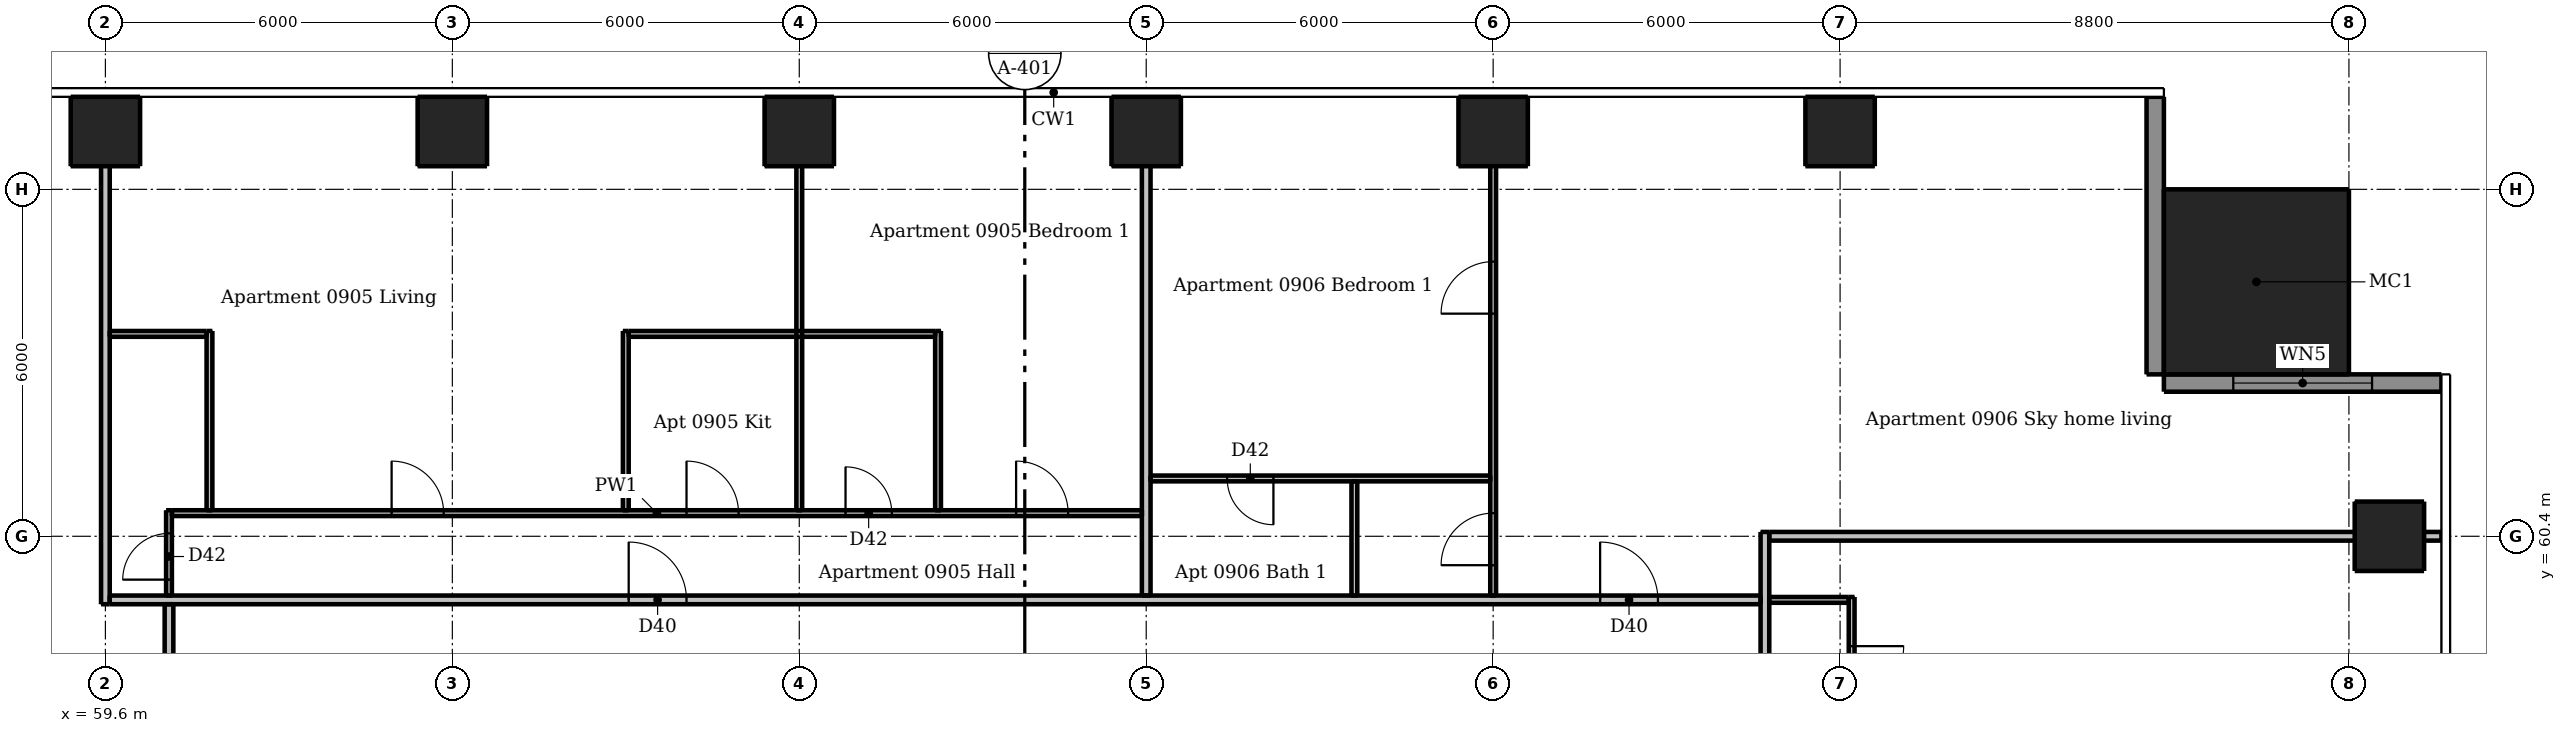
"""IFC4 building model, lengths in metres.
Left out: names, types, materials, properties, quantities, classifications, styles, units other than length and angle.
Written with IfcOpenShell. Run it as: python <this file> out.ifc"""

import sys

from ifc_helpers import new_model, si_unit, direction, frame, frame_2d, origin, origin_2d, place, context, subcontext, project, spatial, rectangle, extrude, element, fill, save


model = new_model("IFC4")
c1 = context("Model", 3, precision=1e-05, world=origin(), true_north=direction((0.0, 1.0)))
c2 = subcontext(c1, "Body", "Model", "MODEL_VIEW")
j1 = project(units=[si_unit("LENGTHUNIT", "METRE"), si_unit("PLANEANGLEUNIT", "RADIAN")], contexts=[c1])
p1 = place(None, origin())
s1 = spatial("IfcSite", under=j1, at=p1, CompositionType="ELEMENT")
p2 = place(p1, origin())
s2 = spatial("IfcBuilding", under=s1, at=p2, CompositionType="ELEMENT")
p3 = place(p2, frame((0.0, 0.0, 36.7)))
s3 = spatial("IfcBuildingStorey", under=s2, at=p3, CompositionType="ELEMENT", Elevation=36.7)
for number, where, z_axis, x_axis in (
    (1, (99.1, 60.4, 0.0), (0.0, 0.0, 1.0), (1.0, 0.0, 0.0)),
    (2, (59.6, 67.4, 0.0), (0.0, 0.0, 1.0), (1.0, 0.0, 0.0)),
    (3, (65.6, 67.4, 0.0), (0.0, 0.0, 1.0), (1.0, 0.0, 0.0)),
    (4, (71.6, 67.4, 0.0), (0.0, 0.0, 1.0), (1.0, 0.0, 0.0)),
    (5, (77.6, 67.4, 0.0), (0.0, 0.0, 1.0), (1.0, 0.0, 0.0)),
    (6, (83.6, 67.4, 0.0), (0.0, 0.0, 1.0), (1.0, 0.0, 0.0)),
    (7, (89.6, 67.4, 0.0), (0.0, 0.0, 1.0), (1.0, 0.0, 0.0)),
):
    element("IfcColumn", number, at=place(p3, frame(where, z_axis=z_axis, x_axis=x_axis)), inside=s3, PredefinedType="COLUMN", context=c2, shape_type="SweptSolid", body=[
        extrude(rectangle(XDim=1.2, YDim=1.2, at=origin_2d()), origin(), (0.0, 0.0, 1.0), 3.05),
    ])
p4 = place(p3, frame((96.8, 64.8, 0.0), z_axis=(0.0, 0.0, 1.0), x_axis=(1.0, 0.0, 0.0)))
e8 = element("IfcColumn", 8, at=p4, inside=s3, PredefinedType="COLUMN", context=c2, shape_type="SweptSolid", body=[
    extrude(rectangle(XDim=3.2, YDim=3.2, at=origin_2d()), origin(), (0.0, 0.0, 1.0), 3.3),
])
p5 = place(p3, frame((100.0, 63.05, 0.0), z_axis=(0.0, 0.0, 1.0), x_axis=(-1.0, 0.0, 0.0)))
e9 = element("IfcWall", 9, at=p5, inside=s3, PredefinedType="SOLIDWALL", context=c2, shape_type="SweptSolid", body=[
    extrude(rectangle(XDim=4.8, YDim=0.3, at=frame_2d((2.4, 0.0))), origin(), (0.0, 0.0, 1.0), 3.05),
])
p6 = place(p5, frame((1.2, 0.0, 0.15)))
e10 = element("IfcOpeningElement", 10, at=p6, cuts=e9, PredefinedType="OPENING", context=c2, shape_type="SweptSolid", body=[
    extrude(rectangle(XDim=2.4, YDim=2.1, at=frame_2d((1.2, 1.05))), frame((0.0, 0.16, 0.0), z_axis=(0.0, -1.0, 0.0), x_axis=(1.0, 0.0, 0.0)), (0.0, 0.0, 1.0), 0.32),
])
p7 = place(p3, frame((95.05, 63.2, 0.0), z_axis=(0.0, 0.0, 1.0), x_axis=(0.0, 1.0, 0.0)))
e11 = element("IfcWall", 11, at=p7, inside=s3, PredefinedType="SOLIDWALL", context=c2, shape_type="SweptSolid", body=[
    extrude(rectangle(XDim=4.8, YDim=0.3, at=frame_2d((2.4, 0.0))), origin(), (0.0, 0.0, 1.0), 3.05),
])
p8 = place(p3, frame((60.7, 59.375, 0.0), z_axis=(0.0, 0.0, 1.0), x_axis=(0.0, 1.0, 0.0)))
e12 = element("IfcWall", 12, at=p8, inside=s3, PredefinedType="PARTITIONING", context=c2, shape_type="SweptSolid", body=[
    extrude(rectangle(XDim=1.475, YDim=0.1, at=frame_2d((0.738, 0.0))), origin(), (0.0, 0.0, 1.0), 3.05),
])
p9 = place(p8, frame((0.275, 0.0, 0.0)))
e13 = element("IfcOpeningElement", 13, at=p9, cuts=e12, PredefinedType="OPENING", context=c2, shape_type="SweptSolid", body=[
    extrude(rectangle(XDim=0.8, YDim=2.1, at=frame_2d((0.4, 1.05))), frame((0.0, 0.06, 0.0), z_axis=(0.0, -1.0, 0.0), x_axis=(1.0, 0.0, 0.0)), (0.0, 0.0, 1.0), 0.12),
])
for number, where, z_axis, x_axis in (
    (14, (61.4, 60.85, 0.0), (0.0, 0.0, 1.0), (0.0, 1.0, 0.0)),
    (15, (68.6, 60.85, 0.0), (0.0, 0.0, 1.0), (0.0, 1.0, 0.0)),
):
    element("IfcWall", number, at=place(p3, frame(where, z_axis=z_axis, x_axis=x_axis)), inside=s3, PredefinedType="PARTITIONING", context=c2, shape_type="SweptSolid", body=[
        extrude(rectangle(XDim=3.1, YDim=0.1, at=frame_2d((1.55, 0.0))), origin(), (0.0, 0.0, 1.0), 3.05),
    ])
p10 = place(p3, frame((71.6, 60.85, 0.0), z_axis=(0.0, 0.0, 1.0), x_axis=(0.0, 1.0, 0.0)))
e16 = element("IfcWall", 16, at=p10, inside=s3, PredefinedType="PARTITIONING", context=c2, shape_type="SweptSolid", body=[
    extrude(rectangle(XDim=7.15, YDim=0.1, at=frame_2d((3.575, 0.0))), origin(), (0.0, 0.0, 1.0), 2.516),
])
p11 = place(p3, frame((74.0, 60.85, 0.0), z_axis=(0.0, 0.0, 1.0), x_axis=(0.0, 1.0, 0.0)))
e17 = element("IfcWall", 17, at=p11, inside=s3, PredefinedType="PARTITIONING", context=c2, shape_type="SweptSolid", body=[
    extrude(rectangle(XDim=3.1, YDim=0.1, at=frame_2d((1.55, 0.0))), origin(), (0.0, 0.0, 1.0), 3.05),
])
p12 = place(p3, frame((81.2, 59.375, 0.0), z_axis=(0.0, 0.0, 1.0), x_axis=(0.0, 1.0, 0.0)))
e18 = element("IfcWall", 18, at=p12, inside=s3, PredefinedType="PARTITIONING", context=c2, shape_type="SweptSolid", body=[
    extrude(rectangle(XDim=1.975, YDim=0.1, at=frame_2d((0.988, 0.0))), origin(), (0.0, 0.0, 1.0), 3.05),
])
p13 = place(p3, frame((83.6, 59.375, 0.0), z_axis=(0.0, 0.0, 1.0), x_axis=(0.0, 1.0, 0.0)))
e19 = element("IfcWall", 19, at=p13, inside=s3, PredefinedType="PARTITIONING", context=c2, shape_type="SweptSolid", body=[
    extrude(rectangle(XDim=8.625, YDim=0.1, at=frame_2d((4.312, 0.0))), origin(), (0.0, 0.0, 1.0), 2.516),
])
p14 = place(p13, frame((0.525, 0.0, 0.0)))
e20 = element("IfcOpeningElement", 20, at=p14, cuts=e19, PredefinedType="OPENING", context=c2, shape_type="SweptSolid", body=[
    extrude(rectangle(XDim=0.9, YDim=2.1, at=frame_2d((0.45, 1.05))), frame((0.0, 0.06, 0.0), z_axis=(0.0, -1.0, 0.0), x_axis=(1.0, 0.0, 0.0)), (0.0, 0.0, 1.0), 0.12),
])
p15 = place(p13, frame((4.875, 0.0, 0.0)))
e21 = element("IfcOpeningElement", 21, at=p15, cuts=e19, PredefinedType="OPENING", context=c2, shape_type="SweptSolid", body=[
    extrude(rectangle(XDim=0.9, YDim=2.1, at=frame_2d((0.45, 1.05))), frame((0.0, 0.06, 0.0), z_axis=(0.0, -1.0, 0.0), x_axis=(1.0, 0.0, 0.0)), (0.0, 0.0, 1.0), 0.12),
])
p16 = place(p3, frame((89.8, 59.35, 0.0), z_axis=(0.0, 0.0, 1.0), x_axis=(0.0, -1.0, 0.0)))
e22 = element("IfcWall", 22, at=p16, inside=s3, PredefinedType="PARTITIONING", context=c2, shape_type="SweptSolid", body=[
    extrude(rectangle(XDim=19.875, YDim=0.1, at=frame_2d((9.938, 0.0))), origin(), (0.0, 0.0, 1.0), 3.05),
])
p17 = place(p16, frame((15.0, 0.0, 0.0)))
e23 = element("IfcOpeningElement", 23, at=p17, cuts=e22, PredefinedType="OPENING", context=c2, shape_type="SweptSolid", body=[
    extrude(rectangle(XDim=0.9, YDim=2.1, at=frame_2d((0.45, 1.05))), frame((0.0, 0.06, 0.0), z_axis=(0.0, -1.0, 0.0), x_axis=(1.0, 0.0, 0.0)), (0.0, 0.0, 1.0), 0.12),
])
p18 = place(p16, frame((9.0, 0.0, 0.0)))
e24 = element("IfcOpeningElement", 24, at=p18, cuts=e22, PredefinedType="OPENING", context=c2, shape_type="SweptSolid", body=[
    extrude(rectangle(XDim=0.9, YDim=2.1, at=frame_2d((0.45, 1.05))), frame((0.0, 0.06, 0.0), z_axis=(0.0, -1.0, 0.0), x_axis=(1.0, 0.0, 0.0)), (0.0, 0.0, 1.0), 0.12),
])
p19 = place(p16, frame((6.0, 0.0, 0.0)))
e25 = element("IfcOpeningElement", 25, at=p19, cuts=e22, PredefinedType="OPENING", context=c2, shape_type="SweptSolid", body=[
    extrude(rectangle(XDim=0.9, YDim=2.1, at=frame_2d((0.45, 1.05))), frame((0.0, 0.06, 0.0), z_axis=(0.0, -1.0, 0.0), x_axis=(1.0, 0.0, 0.0)), (0.0, 0.0, 1.0), 0.12),
])
p20 = place(p16, frame((0.85, 0.0, 0.0)))
e26 = element("IfcOpeningElement", 26, at=p20, cuts=e22, PredefinedType="OPENING", context=c2, shape_type="SweptSolid", body=[
    extrude(rectangle(XDim=0.9, YDim=2.1, at=frame_2d((0.45, 1.05))), frame((0.0, 0.06, 0.0), z_axis=(0.0, -1.0, 0.0), x_axis=(1.0, 0.0, 0.0)), (0.0, 0.0, 1.0), 0.12),
])
p21 = place(p16, frame((3.35, 0.0, 0.0)))
e27 = element("IfcOpeningElement", 27, at=p21, cuts=e22, PredefinedType="OPENING", context=c2, shape_type="SweptSolid", body=[
    extrude(rectangle(XDim=0.8, YDim=2.1, at=frame_2d((0.4, 1.05))), frame((0.0, 0.06, 0.0), z_axis=(0.0, -1.0, 0.0), x_axis=(1.0, 0.0, 0.0)), (0.0, 0.0, 1.0), 0.12),
])
p22 = place(p3, frame((59.675, 63.9, 0.0), z_axis=(0.0, 0.0, 1.0), x_axis=(1.0, 0.0, 0.0)))
e28 = element("IfcWall", 28, at=p22, inside=s3, PredefinedType="PARTITIONING", context=c2, shape_type="SweptSolid", body=[
    extrude(rectangle(XDim=1.675, YDim=0.1, at=frame_2d((0.837, 0.0))), origin(), (0.0, 0.0, 1.0), 3.05),
])
p23 = place(p3, frame((68.65, 63.9, 0.0), z_axis=(0.0, 0.0, 1.0), x_axis=(1.0, 0.0, 0.0)))
e29 = element("IfcWall", 29, at=p23, inside=s3, PredefinedType="PARTITIONING", context=c2, shape_type="SweptSolid", body=[
    extrude(rectangle(XDim=5.3, YDim=0.1, at=frame_2d((2.65, 0.0))), origin(), (0.0, 0.0, 1.0), 3.05),
])
p24 = place(p3, frame((83.55, 61.4, 0.0), z_axis=(0.0, 0.0, 1.0), x_axis=(-1.0, 0.0, 0.0)))
e30 = element("IfcWall", 30, at=p24, inside=s3, PredefinedType="PARTITIONING", context=c2, shape_type="SweptSolid", body=[
    extrude(rectangle(XDim=5.875, YDim=0.1, at=frame_2d((2.938, 0.0))), origin(), (0.0, 0.0, 1.0), 3.05),
])
p25 = place(p24, frame((3.75, 0.0, 0.0)))
e31 = element("IfcOpeningElement", 31, at=p25, cuts=e30, PredefinedType="OPENING", context=c2, shape_type="SweptSolid", body=[
    extrude(rectangle(XDim=0.8, YDim=2.1, at=frame_2d((0.4, 1.05))), frame((0.0, 0.06, 0.0), z_axis=(0.0, -1.0, 0.0), x_axis=(1.0, 0.0, 0.0)), (0.0, 0.0, 1.0), 0.12),
])
p26 = place(p3, frame((60.75, 60.8, 0.0), z_axis=(0.0, 0.0, 1.0), x_axis=(1.0, 0.0, 0.0)))
e32 = element("IfcWall", 32, at=p26, inside=s3, PredefinedType="PARTITIONING", context=c2, shape_type="SweptSolid", body=[
    extrude(rectangle(XDim=16.775, YDim=0.1, at=frame_2d((8.387, 0.0))), origin(), (0.0, 0.0, 1.0), 3.05),
])
p27 = place(p26, frame((3.8, 0.0, 0.0)))
e33 = element("IfcOpeningElement", 33, at=p27, cuts=e32, PredefinedType="OPENING", context=c2, shape_type="SweptSolid", body=[
    extrude(rectangle(XDim=0.9, YDim=2.1, at=frame_2d((0.45, 1.05))), frame((0.0, 0.06, 0.0), z_axis=(0.0, -1.0, 0.0), x_axis=(1.0, 0.0, 0.0)), (0.0, 0.0, 1.0), 0.12),
])
p28 = place(p26, frame((8.9, 0.0, 0.0)))
e34 = element("IfcOpeningElement", 34, at=p28, cuts=e32, PredefinedType="OPENING", context=c2, shape_type="SweptSolid", body=[
    extrude(rectangle(XDim=0.9, YDim=2.1, at=frame_2d((0.45, 1.05))), frame((0.0, 0.06, 0.0), z_axis=(0.0, -1.0, 0.0), x_axis=(1.0, 0.0, 0.0)), (0.0, 0.0, 1.0), 0.12),
])
p29 = place(p26, frame((14.6, 0.0, 0.0)))
e35 = element("IfcOpeningElement", 35, at=p29, cuts=e32, PredefinedType="OPENING", context=c2, shape_type="SweptSolid", body=[
    extrude(rectangle(XDim=0.9, YDim=2.1, at=frame_2d((0.45, 1.05))), frame((0.0, 0.06, 0.0), z_axis=(0.0, -1.0, 0.0), x_axis=(1.0, 0.0, 0.0)), (0.0, 0.0, 1.0), 0.12),
])
p30 = place(p26, frame((11.65, 0.0, 0.0)))
e36 = element("IfcOpeningElement", 36, at=p30, cuts=e32, PredefinedType="OPENING", context=c2, shape_type="SweptSolid", body=[
    extrude(rectangle(XDim=0.8, YDim=2.1, at=frame_2d((0.4, 1.05))), frame((0.0, 0.06, 0.0), z_axis=(0.0, -1.0, 0.0), x_axis=(1.0, 0.0, 0.0)), (0.0, 0.0, 1.0), 0.12),
])
p31 = place(p3, frame((88.375, 59.3, 0.0), z_axis=(0.0, 0.0, 1.0), x_axis=(1.0, 0.0, 0.0)))
e37 = element("IfcWall", 37, at=p31, inside=s3, PredefinedType="PARTITIONING", context=c2, shape_type="SweptSolid", body=[
    extrude(rectangle(XDim=1.375, YDim=0.1, at=frame_2d((0.688, 0.0))), origin(), (0.0, 0.0, 1.0), 3.05),
])
p32 = place(p3, frame((59.6, 59.225, 0.0), z_axis=(0.0, 0.0, 1.0), x_axis=(0.0, 1.0, 0.0)))
e38 = element("IfcWall", 38, at=p32, inside=s3, PredefinedType="PARTITIONING", context=c2, shape_type="SweptSolid", body=[
    extrude(rectangle(XDim=8.775, YDim=0.15, at=frame_2d((4.387, 0.0))), origin(), (0.0, 0.0, 1.0), 2.51),
])
p33 = place(p3, frame((60.7, 30.325, 0.0), z_axis=(0.0, 0.0, 1.0), x_axis=(0.0, 1.0, 0.0)))
e39 = element("IfcWall", 39, at=p33, inside=s3, PredefinedType="PARTITIONING", context=c2, shape_type="SweptSolid", body=[
    extrude(rectangle(XDim=28.9, YDim=0.15, at=frame_2d((14.45, 0.0))), origin(), (0.0, 0.0, 1.0), 3.05),
])
p34 = place(p33, frame((9.225, 0.0, 0.0)))
e40 = element("IfcOpeningElement", 40, at=p34, cuts=e39, PredefinedType="OPENING", context=c2, shape_type="SweptSolid", body=[
    extrude(rectangle(XDim=1.0, YDim=2.1, at=frame_2d((0.5, 1.05))), frame((0.0, 0.085, 0.0), z_axis=(0.0, -1.0, 0.0), x_axis=(1.0, 0.0, 0.0)), (0.0, 0.0, 1.0), 0.17),
])
p35 = place(p33, frame((26.025, 0.0, 0.0)))
e41 = element("IfcOpeningElement", 41, at=p35, cuts=e39, PredefinedType="OPENING", context=c2, shape_type="SweptSolid", body=[
    extrude(rectangle(XDim=1.0, YDim=2.1, at=frame_2d((0.5, 1.05))), frame((0.0, 0.085, 0.0), z_axis=(0.0, -1.0, 0.0), x_axis=(1.0, 0.0, 0.0)), (0.0, 0.0, 1.0), 0.17),
])
p36 = place(p3, frame((77.6, 59.375, 0.0), z_axis=(0.0, 0.0, 1.0), x_axis=(0.0, 1.0, 0.0)))
e42 = element("IfcWall", 42, at=p36, inside=s3, PredefinedType="PARTITIONING", context=c2, shape_type="SweptSolid", body=[
    extrude(rectangle(XDim=8.625, YDim=0.15, at=frame_2d((4.312, 0.0))), origin(), (0.0, 0.0, 1.0), 2.516),
])
p37 = place(p3, frame((88.3, 60.475, 0.0), z_axis=(0.0, 0.0, 1.0), x_axis=(0.0, -1.0, 0.0)))
e43 = element("IfcWall", 43, at=p37, inside=s3, PredefinedType="PARTITIONING", context=c2, shape_type="SweptSolid", body=[
    extrude(rectangle(XDim=28.7, YDim=0.15, at=frame_2d((14.35, 0.0))), origin(), (0.0, 0.0, 1.0), 3.05),
])
p38 = place(p37, frame((27.425, 0.0, 0.0)))
e44 = element("IfcOpeningElement", 44, at=p38, cuts=e43, PredefinedType="OPENING", context=c2, shape_type="SweptSolid", body=[
    extrude(rectangle(XDim=1.0, YDim=2.1, at=frame_2d((0.5, 1.05))), frame((0.0, 0.085, 0.0), z_axis=(0.0, -1.0, 0.0), x_axis=(1.0, 0.0, 0.0)), (0.0, 0.0, 1.0), 0.17),
])
p39 = place(p37, frame((10.625, 0.0, 0.0)))
e45 = element("IfcOpeningElement", 45, at=p39, cuts=e43, PredefinedType="OPENING", context=c2, shape_type="SweptSolid", body=[
    extrude(rectangle(XDim=1.0, YDim=2.1, at=frame_2d((0.5, 1.05))), frame((0.0, 0.085, 0.0), z_axis=(0.0, -1.0, 0.0), x_axis=(1.0, 0.0, 0.0)), (0.0, 0.0, 1.0), 0.17),
])
p40 = place(p3, frame((88.375, 60.4, 0.0), z_axis=(0.0, 0.0, 1.0), x_axis=(1.0, 0.0, 0.0)))
e46 = element("IfcWall", 46, at=p40, inside=s3, PredefinedType="PARTITIONING", context=c2, shape_type="SweptSolid", body=[
    extrude(rectangle(XDim=11.625, YDim=0.15, at=frame_2d((5.812, 0.0))), origin(), (0.0, 0.0, 1.0), 2.516),
])
p41 = place(p3, frame((59.675, 59.3, 0.0), z_axis=(0.0, 0.0, 1.0), x_axis=(1.0, 0.0, 0.0)))
e47 = element("IfcWall", 47, at=p41, inside=s3, PredefinedType="PARTITIONING", context=c2, shape_type="SweptSolid", body=[
    extrude(rectangle(XDim=28.55, YDim=0.15, at=frame_2d((14.275, 0.0))), origin(), (0.0, 0.0, 1.0), 3.05),
])
p42 = place(p41, frame((8.975, 0.0, 0.0)))
e48 = element("IfcOpeningElement", 48, at=p42, cuts=e47, PredefinedType="OPENING", context=c2, shape_type="SweptSolid", body=[
    extrude(rectangle(XDim=1.0, YDim=2.1, at=frame_2d((0.5, 1.05))), frame((0.0, 0.085, 0.0), z_axis=(0.0, -1.0, 0.0), x_axis=(1.0, 0.0, 0.0)), (0.0, 0.0, 1.0), 0.17),
])
p43 = place(p41, frame((25.775, 0.0, 0.0)))
e49 = element("IfcOpeningElement", 49, at=p43, cuts=e47, PredefinedType="OPENING", context=c2, shape_type="SweptSolid", body=[
    extrude(rectangle(XDim=1.0, YDim=2.1, at=frame_2d((0.5, 1.05))), frame((0.0, 0.085, 0.0), z_axis=(0.0, -1.0, 0.0), x_axis=(1.0, 0.0, 0.0)), (0.0, 0.0, 1.0), 0.17),
])
p44 = place(p6, origin())
e50 = element("IfcWindow", 50, at=p44, inside=s3, PartitioningType="DOUBLE_PANEL_VERTICAL", PredefinedType="WINDOW", context=c2, shape_type="SweptSolid", body=[
    extrude(rectangle(XDim=2.4, YDim=2.1, at=frame_2d((1.2, 1.05))), frame((0.0, 0.03, 0.0), z_axis=(0.0, -1.0, 0.0), x_axis=(1.0, 0.0, 0.0)), (0.0, 0.0, 1.0), 0.06),
])
fill(e10, e50)
p45 = place(p20, origin())
e51 = element("IfcDoor", 51, at=p45, inside=s3, OperationType="SINGLE_SWING_LEFT", PredefinedType="DOOR", context=c2, shape_type="SweptSolid", body=[
    extrude(rectangle(XDim=0.9, YDim=2.1, at=frame_2d((0.45, 1.05))), frame((0.0, 0.025, 0.0), z_axis=(0.0, -1.0, 0.0), x_axis=(1.0, 0.0, 0.0)), (0.0, 0.0, 1.0), 0.05),
])
fill(e26, e51)
p46 = place(p42, origin())
e52 = element("IfcDoor", 52, at=p46, inside=s3, OperationType="SINGLE_SWING_LEFT", PredefinedType="DOOR", context=c2, shape_type="SweptSolid", body=[
    extrude(rectangle(XDim=1.0, YDim=2.1, at=frame_2d((0.5, 1.05))), frame((0.0, 0.025, 0.0), z_axis=(0.0, -1.0, 0.0), x_axis=(1.0, 0.0, 0.0)), (0.0, 0.0, 1.0), 0.05),
])
fill(e48, e52)
p47 = place(p27, origin())
e53 = element("IfcDoor", 53, at=p47, inside=s3, OperationType="SINGLE_SWING_LEFT", PredefinedType="DOOR", context=c2, shape_type="SweptSolid", body=[
    extrude(rectangle(XDim=0.9, YDim=2.1, at=frame_2d((0.45, 1.05))), frame((0.0, 0.025, 0.0), z_axis=(0.0, -1.0, 0.0), x_axis=(1.0, 0.0, 0.0)), (0.0, 0.0, 1.0), 0.05),
])
fill(e33, e53)
p48 = place(p28, origin())
e54 = element("IfcDoor", 54, at=p48, inside=s3, OperationType="SINGLE_SWING_LEFT", PredefinedType="DOOR", context=c2, shape_type="SweptSolid", body=[
    extrude(rectangle(XDim=0.9, YDim=2.1, at=frame_2d((0.45, 1.05))), frame((0.0, 0.025, 0.0), z_axis=(0.0, -1.0, 0.0), x_axis=(1.0, 0.0, 0.0)), (0.0, 0.0, 1.0), 0.05),
])
fill(e34, e54)
p49 = place(p9, origin())
e55 = element("IfcDoor", 55, at=p49, inside=s3, OperationType="SINGLE_SWING_LEFT", PredefinedType="DOOR", context=c2, shape_type="SweptSolid", body=[
    extrude(rectangle(XDim=0.8, YDim=2.1, at=frame_2d((0.4, 1.05))), frame((0.0, 0.025, 0.0), z_axis=(0.0, -1.0, 0.0), x_axis=(1.0, 0.0, 0.0)), (0.0, 0.0, 1.0), 0.05),
])
fill(e13, e55)
p50 = place(p29, origin())
e56 = element("IfcDoor", 56, at=p50, inside=s3, OperationType="SINGLE_SWING_LEFT", PredefinedType="DOOR", context=c2, shape_type="SweptSolid", body=[
    extrude(rectangle(XDim=0.9, YDim=2.1, at=frame_2d((0.45, 1.05))), frame((0.0, 0.025, 0.0), z_axis=(0.0, -1.0, 0.0), x_axis=(1.0, 0.0, 0.0)), (0.0, 0.0, 1.0), 0.05),
])
fill(e35, e56)
p51 = place(p30, origin())
e57 = element("IfcDoor", 57, at=p51, inside=s3, OperationType="SINGLE_SWING_LEFT", PredefinedType="DOOR", context=c2, shape_type="SweptSolid", body=[
    extrude(rectangle(XDim=0.8, YDim=2.1, at=frame_2d((0.4, 1.05))), frame((0.0, 0.025, 0.0), z_axis=(0.0, -1.0, 0.0), x_axis=(1.0, 0.0, 0.0)), (0.0, 0.0, 1.0), 0.05),
])
fill(e36, e57)
p52 = place(p43, origin())
e58 = element("IfcDoor", 58, at=p52, inside=s3, OperationType="SINGLE_SWING_LEFT", PredefinedType="DOOR", context=c2, shape_type="SweptSolid", body=[
    extrude(rectangle(XDim=1.0, YDim=2.1, at=frame_2d((0.5, 1.05))), frame((0.0, 0.025, 0.0), z_axis=(0.0, -1.0, 0.0), x_axis=(1.0, 0.0, 0.0)), (0.0, 0.0, 1.0), 0.05),
])
fill(e49, e58)
p53 = place(p14, origin())
e59 = element("IfcDoor", 59, at=p53, inside=s3, OperationType="SINGLE_SWING_LEFT", PredefinedType="DOOR", context=c2, shape_type="SweptSolid", body=[
    extrude(rectangle(XDim=0.9, YDim=2.1, at=frame_2d((0.45, 1.05))), frame((0.0, 0.025, 0.0), z_axis=(0.0, -1.0, 0.0), x_axis=(1.0, 0.0, 0.0)), (0.0, 0.0, 1.0), 0.05),
])
fill(e20, e59)
p54 = place(p15, origin())
e60 = element("IfcDoor", 60, at=p54, inside=s3, OperationType="SINGLE_SWING_LEFT", PredefinedType="DOOR", context=c2, shape_type="SweptSolid", body=[
    extrude(rectangle(XDim=0.9, YDim=2.1, at=frame_2d((0.45, 1.05))), frame((0.0, 0.025, 0.0), z_axis=(0.0, -1.0, 0.0), x_axis=(1.0, 0.0, 0.0)), (0.0, 0.0, 1.0), 0.05),
])
fill(e21, e60)
p55 = place(p25, origin())
e61 = element("IfcDoor", 61, at=p55, inside=s3, OperationType="SINGLE_SWING_LEFT", PredefinedType="DOOR", context=c2, shape_type="SweptSolid", body=[
    extrude(rectangle(XDim=0.8, YDim=2.1, at=frame_2d((0.4, 1.05))), frame((0.0, 0.025, 0.0), z_axis=(0.0, -1.0, 0.0), x_axis=(1.0, 0.0, 0.0)), (0.0, 0.0, 1.0), 0.05),
])
fill(e31, e61)
save(model, sys.argv[1])
